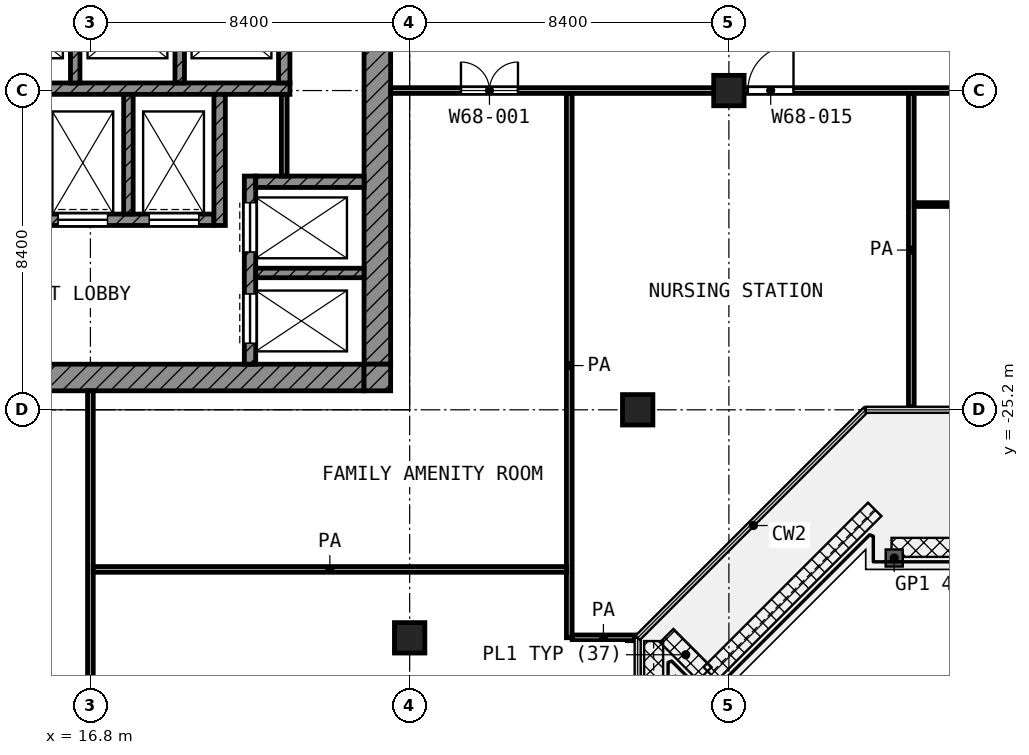
"""IFC4 building model, lengths in metres.
Left out: names, types, materials, properties, quantities, classifications, styles, units other than length and angle.
Written with IfcOpenShell. Run it as: python <this file> out.ifc"""

import sys

from ifc_helpers import new_model, si_unit, direction, frame, frame_2d, origin, origin_2d, place, context, subcontext, project, spatial, rectangle, extrude, element, fill, save


model = new_model("IFC4")
c1 = context("Model", 3, precision=1e-05, world=origin(), true_north=direction((0.0, 1.0)))
c2 = subcontext(c1, "Body", "Model", "MODEL_VIEW")
j1 = project(units=[si_unit("LENGTHUNIT", "METRE"), si_unit("PLANEANGLEUNIT", "RADIAN")], contexts=[c1])
p1 = place(None, origin())
s1 = spatial("IfcSite", under=j1, at=p1, CompositionType="ELEMENT")
p2 = place(p1, origin())
s2 = spatial("IfcBuilding", under=s1, at=p2, CompositionType="ELEMENT")
p3 = place(p2, frame((0.0, 0.0, 294.4)))
s3 = spatial("IfcBuildingStorey", under=s2, at=p3, CompositionType="ELEMENT", Elevation=294.4)
for number, where, z_axis, x_axis in (
    (1, (33.6, -16.8, 0.0), (0.0, 0.0, 1.0), (1.0, 0.0, 0.0)),
    (2, (31.2, -25.2, 0.0), (0.0, 0.0, 1.0), (1.0, 0.0, 0.0)),
    (3, (25.2, -31.2, 0.0), (0.0, 0.0, 1.0), (1.0, 0.0, 0.0)),
):
    element("IfcColumn", number, at=place(p3, frame(where, z_axis=z_axis, x_axis=x_axis)), inside=s3, PredefinedType="COLUMN", context=c2, shape_type="SweptSolid", body=[
        extrude(rectangle(XDim=0.8, YDim=0.8, at=origin_2d()), origin(), (0.0, 0.0, 1.0), 4.2),
    ])
p4 = place(p3, frame((24.35, -24.0, 0.0), z_axis=(0.0, 0.0, 1.0), x_axis=(0.0, 1.0, 0.0)))
e4 = element("IfcWall", 4, at=p4, inside=s3, PredefinedType="SHEAR", context=c2, shape_type="SweptSolid", body=[
    extrude(rectangle(XDim=18.6, YDim=0.7, at=frame_2d((9.3, 0.0))), origin(), (0.0, 0.0, 1.0), 3.6),
])
p5 = place(p4, frame((10.5, 0.0, 0.0)))
e5 = element("IfcOpeningElement", 5, at=p5, cuts=e4, PredefinedType="OPENING", context=c2, shape_type="SweptSolid", body=[
    extrude(rectangle(XDim=1.8, YDim=2.1, at=frame_2d((0.9, 1.05))), frame((0.0, 0.36, 0.0), z_axis=(0.0, -1.0, 0.0), x_axis=(1.0, 0.0, 0.0)), (0.0, 0.0, 1.0), 0.72),
])
p6 = place(p3, frame((5.4, -24.35, 0.0), z_axis=(0.0, 0.0, 1.0), x_axis=(1.0, 0.0, 0.0)))
e6 = element("IfcWall", 6, at=p6, inside=s3, PredefinedType="SHEAR", context=c2, shape_type="SweptSolid", body=[
    extrude(rectangle(XDim=18.6, YDim=0.7, at=frame_2d((9.3, 0.0))), origin(), (0.0, 0.0, 1.0), 3.6),
])
p7 = place(p6, frame((6.3, 0.0, 0.0)))
e7 = element("IfcOpeningElement", 7, at=p7, cuts=e6, PredefinedType="OPENING", context=c2, shape_type="SweptSolid", body=[
    extrude(rectangle(XDim=1.8, YDim=2.1, at=frame_2d((0.9, 1.05))), frame((0.0, 0.36, 0.0), z_axis=(0.0, -1.0, 0.0), x_axis=(1.0, 0.0, 0.0)), (0.0, 0.0, 1.0), 0.72),
])
p8 = place(p3, frame((24.35, -24.7, 0.0), z_axis=(0.0, 0.0, 1.0), x_axis=(0.0, 1.0, 0.0)))
e8 = element("IfcWall", 8, at=p8, inside=s3, PredefinedType="SHEAR", context=c2, shape_type="SweptSolid", body=[
    extrude(rectangle(XDim=0.7, YDim=0.7, at=frame_2d((0.35, 0.0))), origin(), (0.0, 0.0, 1.0), 3.6),
])
p9 = place(p3, frame((5.4, -16.75, 0.0), z_axis=(0.0, 0.0, 1.0), x_axis=(1.0, 0.0, 0.0)))
e9 = element("IfcWall", 9, at=p9, inside=s3, PredefinedType="SHEAR", context=c2, shape_type="SweptSolid", body=[
    extrude(rectangle(XDim=16.65, YDim=0.3, at=frame_2d((8.325, 0.0))), origin(), (0.0, 0.0, 1.0), 3.6),
])
p10 = place(p3, frame((5.4, -20.2, 0.0), z_axis=(0.0, 0.0, 1.0), x_axis=(1.0, 0.0, 0.0)))
e10 = element("IfcWall", 10, at=p10, inside=s3, PredefinedType="SHEAR", context=c2, shape_type="SweptSolid", body=[
    extrude(rectangle(XDim=14.65, YDim=0.3, at=frame_2d((7.325, 0.0))), origin(), (0.0, 0.0, 1.0), 3.6),
])
p11 = place(p10, frame((10.55, 0.0, 0.0)))
e11 = element("IfcOpeningElement", 11, at=p11, cuts=e10, PredefinedType="OPENING", context=c2, shape_type="SweptSolid", body=[
    extrude(rectangle(XDim=1.3, YDim=2.1, at=frame_2d((0.65, 1.05))), frame((0.0, 0.16, 0.0), z_axis=(0.0, -1.0, 0.0), x_axis=(1.0, 0.0, 0.0)), (0.0, 0.0, 1.0), 0.32),
])
p12 = place(p10, frame((12.95, 0.0, 0.0)))
e12 = element("IfcOpeningElement", 12, at=p12, cuts=e10, PredefinedType="OPENING", context=c2, shape_type="SweptSolid", body=[
    extrude(rectangle(XDim=1.3, YDim=2.1, at=frame_2d((0.65, 1.05))), frame((0.0, 0.16, 0.0), z_axis=(0.0, -1.0, 0.0), x_axis=(1.0, 0.0, 0.0)), (0.0, 0.0, 1.0), 0.32),
])
p13 = place(p10, frame((0.55, 0.0, 0.0)))
e13 = element("IfcOpeningElement", 13, at=p13, cuts=e10, PredefinedType="OPENING", context=c2, shape_type="SweptSolid", body=[
    extrude(rectangle(XDim=1.3, YDim=2.1, at=frame_2d((0.65, 1.05))), frame((0.0, 0.16, 0.0), z_axis=(0.0, -1.0, 0.0), x_axis=(1.0, 0.0, 0.0)), (0.0, 0.0, 1.0), 0.32),
])
p14 = place(p10, frame((2.95, 0.0, 0.0)))
e14 = element("IfcOpeningElement", 14, at=p14, cuts=e10, PredefinedType="OPENING", context=c2, shape_type="SweptSolid", body=[
    extrude(rectangle(XDim=1.3, YDim=2.1, at=frame_2d((0.65, 1.05))), frame((0.0, 0.16, 0.0), z_axis=(0.0, -1.0, 0.0), x_axis=(1.0, 0.0, 0.0)), (0.0, 0.0, 1.0), 0.32),
])
p15 = place(p10, frame((7.15, 0.0, 0.0)))
e15 = element("IfcOpeningElement", 15, at=p15, cuts=e10, PredefinedType="OPENING", context=c2, shape_type="SweptSolid", body=[
    extrude(rectangle(XDim=0.9, YDim=2.1, at=frame_2d((0.45, 1.05))), frame((0.0, 0.16, 0.0), z_axis=(0.0, -1.0, 0.0), x_axis=(1.0, 0.0, 0.0)), (0.0, 0.0, 1.0), 0.32),
])
p16 = place(p3, frame((20.2, -20.35, 0.0), z_axis=(0.0, 0.0, 1.0), x_axis=(0.0, 1.0, 0.0)))
e16 = element("IfcWall", 16, at=p16, inside=s3, PredefinedType="SHEAR", context=c2, shape_type="SweptSolid", body=[
    extrude(rectangle(XDim=3.45, YDim=0.3, at=frame_2d((1.725, 0.0))), origin(), (0.0, 0.0, 1.0), 3.6),
])
p17 = place(p3, frame((21.9, -16.6, 0.0), z_axis=(0.0, 0.0, 1.0), x_axis=(0.0, 1.0, 0.0)))
e17 = element("IfcWall", 17, at=p17, inside=s3, PredefinedType="SHEAR", context=c2, shape_type="SweptSolid", body=[
    extrude(rectangle(XDim=2.35, YDim=0.3, at=frame_2d((1.175, 0.0))), origin(), (0.0, 0.0, 1.0), 3.6),
])
p18 = place(p3, frame((21.15, -19.2, 0.0), z_axis=(0.0, 0.0, 1.0), x_axis=(1.0, 0.0, 0.0)))
e18 = element("IfcWall", 18, at=p18, inside=s3, PredefinedType="SHEAR", context=c2, shape_type="SweptSolid", body=[
    extrude(rectangle(XDim=2.85, YDim=0.3, at=frame_2d((1.425, 0.0))), origin(), (0.0, 0.0, 1.0), 3.6),
])
p19 = place(p3, frame((21.0, -24.0, 0.0), z_axis=(0.0, 0.0, 1.0), x_axis=(0.0, 1.0, 0.0)))
e19 = element("IfcWall", 19, at=p19, inside=s3, PredefinedType="SHEAR", context=c2, shape_type="SweptSolid", body=[
    extrude(rectangle(XDim=4.95, YDim=0.3, at=frame_2d((2.475, 0.0))), origin(), (0.0, 0.0, 1.0), 3.6),
])
p20 = place(p19, frame((2.95, 0.0, 0.0)))
e20 = element("IfcOpeningElement", 20, at=p20, cuts=e19, PredefinedType="OPENING", context=c2, shape_type="SweptSolid", body=[
    extrude(rectangle(XDim=1.3, YDim=2.1, at=frame_2d((0.65, 1.05))), frame((0.0, 0.16, 0.0), z_axis=(0.0, -1.0, 0.0), x_axis=(1.0, 0.0, 0.0)), (0.0, 0.0, 1.0), 0.32),
])
p21 = place(p19, frame((0.55, 0.0, 0.0)))
e21 = element("IfcOpeningElement", 21, at=p21, cuts=e19, PredefinedType="OPENING", context=c2, shape_type="SweptSolid", body=[
    extrude(rectangle(XDim=1.3, YDim=2.1, at=frame_2d((0.65, 1.05))), frame((0.0, 0.16, 0.0), z_axis=(0.0, -1.0, 0.0), x_axis=(1.0, 0.0, 0.0)), (0.0, 0.0, 1.0), 0.32),
])
p22 = place(p3, frame((21.15, -21.6, 0.0), z_axis=(0.0, 0.0, 1.0), x_axis=(1.0, 0.0, 0.0)))
e22 = element("IfcWall", 22, at=p22, inside=s3, PredefinedType="SHEAR", context=c2, shape_type="SweptSolid", body=[
    extrude(rectangle(XDim=2.85, YDim=0.25, at=frame_2d((1.425, 0.0))), origin(), (0.0, 0.0, 1.0), 3.6),
])
p23 = place(p3, frame((17.8, -20.05, 0.0), z_axis=(0.0, 0.0, 1.0), x_axis=(0.0, 1.0, 0.0)))
e23 = element("IfcWall", 23, at=p23, inside=s3, PredefinedType="SHEAR", context=c2, shape_type="SweptSolid", body=[
    extrude(rectangle(XDim=3.15, YDim=0.25, at=frame_2d((1.575, 0.0))), origin(), (0.0, 0.0, 1.0), 3.6),
])
for number, where, z_axis, x_axis in (
    (24, (16.4, -16.6, 0.0), (0.0, 0.0, 1.0), (0.0, 1.0, 0.0)),
    (25, (19.15, -16.6, 0.0), (0.0, 0.0, 1.0), (0.0, 1.0, 0.0)),
):
    element("IfcWall", number, at=place(p3, frame(where, z_axis=z_axis, x_axis=x_axis)), inside=s3, PredefinedType="SHEAR", context=c2, shape_type="SweptSolid", body=[
        extrude(rectangle(XDim=2.35, YDim=0.25, at=frame_2d((1.175, 0.0))), origin(), (0.0, 0.0, 1.0), 3.6),
    ])
p24 = place(p3, frame((21.9, -19.05, 0.0), z_axis=(0.0, 0.0, 1.0), x_axis=(0.0, 1.0, 0.0)))
e26 = element("IfcWall", 26, at=p24, inside=s3, PredefinedType="PARTITIONING", context=c2, shape_type="SweptSolid", body=[
    extrude(rectangle(XDim=2.15, YDim=0.15, at=frame_2d((1.075, 0.0))), origin(), (0.0, 0.0, 1.0), 3.6),
])
p25 = place(p3, frame((38.475, -19.8, 0.0), z_axis=(0.0, 0.0, 1.0), x_axis=(1.0, 0.0, 0.0)))
e27 = element("IfcWall", 27, at=p25, inside=s3, PredefinedType="PARTITIONING", context=c2, shape_type="SweptSolid", body=[
    extrude(rectangle(XDim=5.275, YDim=0.1, at=frame_2d((2.637, 0.0))), origin(), (0.0, 0.0, 1.0), 3.6),
])
p26 = place(p25, frame((1.525, 0.0, 0.0)))
e28 = element("IfcOpeningElement", 28, at=p26, cuts=e27, PredefinedType="OPENING", context=c2, shape_type="SweptSolid", body=[
    extrude(rectangle(XDim=1.0, YDim=2.1, at=frame_2d((0.5, 1.05))), frame((0.0, 0.06, 0.0), z_axis=(0.0, -1.0, 0.0), x_axis=(1.0, 0.0, 0.0)), (0.0, 0.0, 1.0), 0.12),
])
p27 = place(p3, frame((29.477, -31.2, 0.0), z_axis=(0.0, 0.0, 1.0), x_axis=(1.0, 0.0, 0.0)))
e29 = element("IfcWall", 29, at=p27, inside=s3, PredefinedType="PARTITIONING", context=c2, shape_type="SweptSolid", body=[
    extrude(rectangle(XDim=1.643, YDim=0.15, at=frame_2d((0.822, 0.0))), origin(), (0.0, 0.0, 1.0), 3.6),
])
p28 = place(p3, frame((16.875, -29.4, 0.0), z_axis=(0.0, 0.0, 1.0), x_axis=(1.0, 0.0, 0.0)))
e30 = element("IfcWall", 30, at=p28, inside=s3, PredefinedType="PARTITIONING", context=c2, shape_type="SweptSolid", body=[
    extrude(rectangle(XDim=12.45, YDim=0.15, at=frame_2d((6.225, 0.0))), origin(), (0.0, 0.0, 1.0), 3.6),
])
p29 = place(p3, frame((24.7, -16.8, 0.0), z_axis=(0.0, 0.0, 1.0), x_axis=(1.0, 0.0, 0.0)))
e31 = element("IfcWall", 31, at=p29, inside=s3, PredefinedType="PARTITIONING", context=c2, shape_type="SweptSolid", body=[
    extrude(rectangle(XDim=34.02, YDim=0.15, at=frame_2d((17.01, 0.0))), origin(), (0.0, 0.0, 1.0), 3.6),
])
p30 = place(p29, frame((1.85, 0.0, 0.0)))
e32 = element("IfcOpeningElement", 32, at=p30, cuts=e31, PredefinedType="OPENING", context=c2, shape_type="SweptSolid", body=[
    extrude(rectangle(XDim=1.5, YDim=2.1, at=frame_2d((0.75, 1.05))), frame((0.0, 0.085, 0.0), z_axis=(0.0, -1.0, 0.0), x_axis=(1.0, 0.0, 0.0)), (0.0, 0.0, 1.0), 0.17),
])
p31 = place(p29, frame((9.4, 0.0, 0.0)))
e33 = element("IfcOpeningElement", 33, at=p31, cuts=e31, PredefinedType="OPENING", context=c2, shape_type="SweptSolid", body=[
    extrude(rectangle(XDim=1.2, YDim=2.1, at=frame_2d((0.6, 1.05))), frame((0.0, 0.085, 0.0), z_axis=(0.0, -1.0, 0.0), x_axis=(1.0, 0.0, 0.0)), (0.0, 0.0, 1.0), 0.17),
])
p32 = place(p29, frame((19.8, 0.0, 0.0)))
e34 = element("IfcOpeningElement", 34, at=p32, cuts=e31, PredefinedType="OPENING", context=c2, shape_type="SweptSolid", body=[
    extrude(rectangle(XDim=1.2, YDim=2.1, at=frame_2d((0.6, 1.05))), frame((0.0, 0.085, 0.0), z_axis=(0.0, -1.0, 0.0), x_axis=(1.0, 0.0, 0.0)), (0.0, 0.0, 1.0), 0.17),
])
p33 = place(p29, frame((18.28, 0.0, 0.0)))
e35 = element("IfcOpeningElement", 35, at=p33, cuts=e31, PredefinedType="OPENING", context=c2, shape_type="SweptSolid", body=[
    extrude(rectangle(XDim=1.2, YDim=2.1, at=frame_2d((0.6, 1.05))), frame((0.0, 0.085, 0.0), z_axis=(0.0, -1.0, 0.0), x_axis=(1.0, 0.0, 0.0)), (0.0, 0.0, 1.0), 0.17),
])
p34 = place(p29, frame((24.0, 0.0, 0.0)))
e36 = element("IfcOpeningElement", 36, at=p34, cuts=e31, PredefinedType="OPENING", context=c2, shape_type="SweptSolid", body=[
    extrude(rectangle(XDim=1.2, YDim=2.1, at=frame_2d((0.6, 1.05))), frame((0.0, 0.085, 0.0), z_axis=(0.0, -1.0, 0.0), x_axis=(1.0, 0.0, 0.0)), (0.0, 0.0, 1.0), 0.17),
])
p35 = place(p29, frame((27.45, 0.0, 0.0)))
e37 = element("IfcOpeningElement", 37, at=p35, cuts=e31, PredefinedType="OPENING", context=c2, shape_type="SweptSolid", body=[
    extrude(rectangle(XDim=1.0, YDim=2.1, at=frame_2d((0.5, 1.05))), frame((0.0, 0.085, 0.0), z_axis=(0.0, -1.0, 0.0), x_axis=(1.0, 0.0, 0.0)), (0.0, 0.0, 1.0), 0.17),
])
p36 = place(p29, frame((31.65, 0.0, 0.0)))
e38 = element("IfcOpeningElement", 38, at=p36, cuts=e31, PredefinedType="OPENING", context=c2, shape_type="SweptSolid", body=[
    extrude(rectangle(XDim=1.0, YDim=2.1, at=frame_2d((0.5, 1.05))), frame((0.0, 0.085, 0.0), z_axis=(0.0, -1.0, 0.0), x_axis=(1.0, 0.0, 0.0)), (0.0, 0.0, 1.0), 0.17),
])
p37 = place(p3, frame((16.8, -41.92, 0.0), z_axis=(0.0, 0.0, 1.0), x_axis=(0.0, 1.0, 0.0)))
e39 = element("IfcWall", 39, at=p37, inside=s3, PredefinedType="PARTITIONING", context=c2, shape_type="SweptSolid", body=[
    extrude(rectangle(XDim=17.22, YDim=0.15, at=frame_2d((8.61, 0.0))), origin(), (0.0, 0.0, 1.0), 3.6),
])
p38 = place(p37, frame((6.62, 0.0, 0.0)))
e40 = element("IfcOpeningElement", 40, at=p38, cuts=e39, PredefinedType="OPENING", context=c2, shape_type="SweptSolid", body=[
    extrude(rectangle(XDim=1.2, YDim=2.1, at=frame_2d((0.6, 1.05))), frame((0.0, 0.085, 0.0), z_axis=(0.0, -1.0, 0.0), x_axis=(1.0, 0.0, 0.0)), (0.0, 0.0, 1.0), 0.17),
])
p39 = place(p37, frame((1.22, 0.0, 0.0)))
e41 = element("IfcOpeningElement", 41, at=p39, cuts=e39, PredefinedType="OPENING", context=c2, shape_type="SweptSolid", body=[
    extrude(rectangle(XDim=1.0, YDim=2.1, at=frame_2d((0.5, 1.05))), frame((0.0, 0.085, 0.0), z_axis=(0.0, -1.0, 0.0), x_axis=(1.0, 0.0, 0.0)), (0.0, 0.0, 1.0), 0.17),
])
p40 = place(p3, frame((29.4, -31.198, 0.0), z_axis=(0.0, 0.0, 1.0), x_axis=(0.0, 1.0, 0.0)))
e42 = element("IfcWall", 42, at=p40, inside=s3, PredefinedType="PARTITIONING", context=c2, shape_type="SweptSolid", body=[
    extrude(rectangle(XDim=14.323, YDim=0.15, at=frame_2d((7.162, 0.0))), origin(), (0.0, 0.0, 1.0), 3.6),
])
p41 = place(p3, frame((38.4, -25.12, 0.0), z_axis=(0.0, 0.0, 1.0), x_axis=(0.0, 1.0, 0.0)))
e43 = element("IfcWall", 43, at=p41, inside=s3, PredefinedType="PARTITIONING", context=c2, shape_type="SweptSolid", body=[
    extrude(rectangle(XDim=8.245, YDim=0.15, at=frame_2d((4.123, 0.0))), origin(), (0.0, 0.0, 1.0), 3.6),
])
p42 = place(p20, origin())
e44 = element("IfcDoor", 44, at=p42, inside=s3, OperationType="DOUBLE_DOOR_SLIDING", PredefinedType="DOOR", context=c2, shape_type="SweptSolid", body=[
    extrude(rectangle(XDim=1.3, YDim=2.1, at=frame_2d((0.65, 1.05))), frame((0.0, 0.025, 0.0), z_axis=(0.0, -1.0, 0.0), x_axis=(1.0, 0.0, 0.0)), (0.0, 0.0, 1.0), 0.05),
])
fill(e20, e44)
p43 = place(p21, origin())
e45 = element("IfcDoor", 45, at=p43, inside=s3, OperationType="DOUBLE_DOOR_SLIDING", PredefinedType="DOOR", context=c2, shape_type="SweptSolid", body=[
    extrude(rectangle(XDim=1.3, YDim=2.1, at=frame_2d((0.65, 1.05))), frame((0.0, 0.025, 0.0), z_axis=(0.0, -1.0, 0.0), x_axis=(1.0, 0.0, 0.0)), (0.0, 0.0, 1.0), 0.05),
])
fill(e21, e45)
p44 = place(p11, origin())
e46 = element("IfcDoor", 46, at=p44, inside=s3, OperationType="DOUBLE_DOOR_SLIDING", PredefinedType="DOOR", context=c2, shape_type="SweptSolid", body=[
    extrude(rectangle(XDim=1.3, YDim=2.1, at=frame_2d((0.65, 1.05))), frame((0.0, 0.025, 0.0), z_axis=(0.0, -1.0, 0.0), x_axis=(1.0, 0.0, 0.0)), (0.0, 0.0, 1.0), 0.05),
])
fill(e11, e46)
p45 = place(p12, origin())
e47 = element("IfcDoor", 47, at=p45, inside=s3, OperationType="DOUBLE_DOOR_SLIDING", PredefinedType="DOOR", context=c2, shape_type="SweptSolid", body=[
    extrude(rectangle(XDim=1.3, YDim=2.1, at=frame_2d((0.65, 1.05))), frame((0.0, 0.025, 0.0), z_axis=(0.0, -1.0, 0.0), x_axis=(1.0, 0.0, 0.0)), (0.0, 0.0, 1.0), 0.05),
])
fill(e12, e47)
p46 = place(p30, origin())
e48 = element("IfcDoor", 48, at=p46, inside=s3, OperationType="DOUBLE_DOOR_SINGLE_SWING", PredefinedType="DOOR", context=c2, shape_type="SweptSolid", body=[
    extrude(rectangle(XDim=1.5, YDim=2.1, at=frame_2d((0.75, 1.05))), frame((0.0, 0.025, 0.0), z_axis=(0.0, -1.0, 0.0), x_axis=(1.0, 0.0, 0.0)), (0.0, 0.0, 1.0), 0.05),
])
fill(e32, e48)
p47 = place(p31, origin())
e49 = element("IfcDoor", 49, at=p47, inside=s3, OperationType="SINGLE_SWING_RIGHT", PredefinedType="DOOR", context=c2, shape_type="SweptSolid", body=[
    extrude(rectangle(XDim=1.2, YDim=2.1, at=frame_2d((0.6, 1.05))), frame((0.0, 0.025, 0.0), z_axis=(0.0, -1.0, 0.0), x_axis=(1.0, 0.0, 0.0)), (0.0, 0.0, 1.0), 0.05),
])
fill(e33, e49)
save(model, sys.argv[1])
